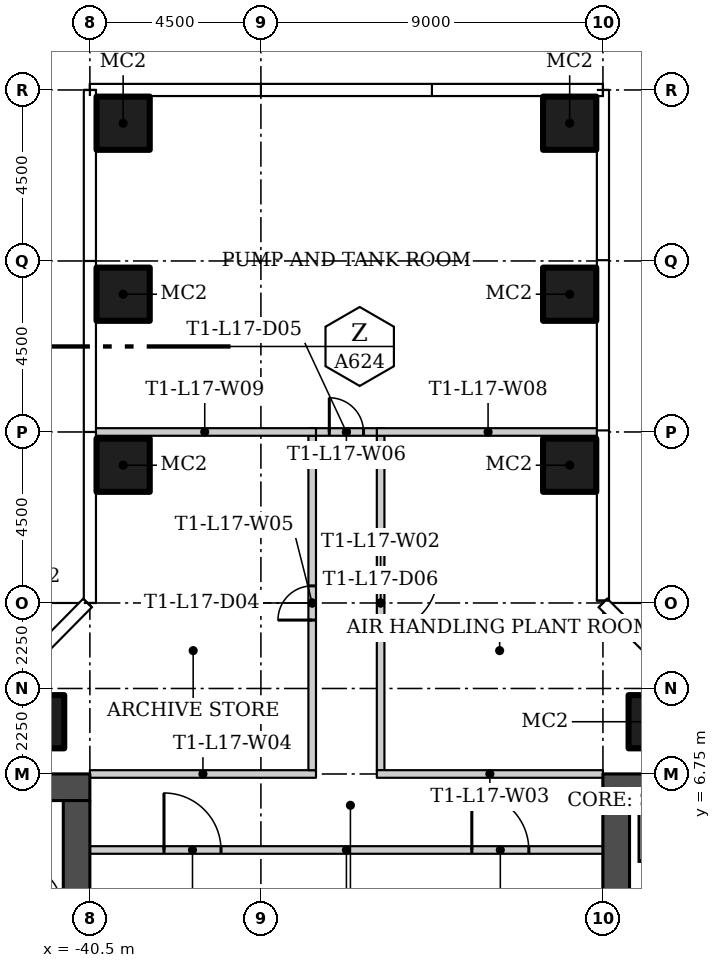
"""IFC4 building model, lengths in metres.
Left out: names, types, materials, properties, quantities, classifications, styles, units other than length and angle.
Written with IfcOpenShell. Run it as: python <this file> out.ifc"""

import sys

from ifc_helpers import new_model, si_unit, direction, frame, frame_2d, origin, origin_2d, place, context, subcontext, project, spatial, rectangle, hollow_rectangle, extrude, element, fill, save


model = new_model("IFC4")
c1 = context("Model", 3, precision=1e-05, world=origin(), true_north=direction((0.0, 1.0)))
c2 = subcontext(c1, "Body", "Model", "MODEL_VIEW")
j1 = project(units=[si_unit("LENGTHUNIT", "METRE"), si_unit("PLANEANGLEUNIT", "RADIAN")], contexts=[c1])
p1 = place(None, origin())
s1 = spatial("IfcSite", under=j1, at=p1, CompositionType="ELEMENT")
p2 = place(p1, origin())
s2 = spatial("IfcBuilding", under=s1, at=p2, CompositionType="ELEMENT")
p3 = place(p2, frame((0.0, 0.0, 77.1)))
s3 = spatial("IfcBuildingStorey", under=s2, at=p3, CompositionType="ELEMENT", Elevation=77.1)
for number, where in (
    (1, (-25.625, 8.125, 0.0)),
    (2, (-41.875, 8.125, 0.0)),
    (3, (-39.625, 14.875, 0.0)),
    (4, (-39.625, 19.375, 0.0)),
    (5, (-39.625, 23.875, 0.0)),
    (6, (-27.875, 14.875, 0.0)),
    (7, (-27.875, 19.375, 0.0)),
    (8, (-27.875, 23.875, 0.0)),
):
    element("IfcColumn", number, at=place(p3, frame(where)), inside=s3, PredefinedType="COLUMN", context=c2, shape_type="SweptSolid", body=[
        extrude(hollow_rectangle(XDim=1.4, YDim=1.4, WallThickness=0.05, at=origin_2d()), origin(), (0.0, 0.0, 1.0), 4.45),
    ])
p4 = place(p3, frame((-40.5, 4.75, 0.0)))
e9 = element("IfcWall", 9, at=p4, inside=s3, PredefinedType="PARTITIONING", context=c2, shape_type="SweptSolid", body=[
    extrude(rectangle(XDim=13.5, YDim=0.2, at=frame_2d((6.75, 0.0))), origin(), (0.0, 0.0, 1.0), 4.45),
])
p5 = place(p4, frame((1.95, 0.0, 0.0)))
e10 = element("IfcOpeningElement", 10, at=p5, cuts=e9, PredefinedType="OPENING", context=c2, shape_type="SweptSolid", body=[
    extrude(rectangle(XDim=1.5, YDim=2.4, at=frame_2d((0.75, 1.2))), frame((0.0, 0.11, 0.0), z_axis=(0.0, -1.0, 0.0), x_axis=(1.0, 0.0, 0.0)), (0.0, 0.0, 1.0), 0.22),
])
p6 = place(p4, frame((10.05, 0.0, 0.0)))
e11 = element("IfcOpeningElement", 11, at=p6, cuts=e9, PredefinedType="OPENING", context=c2, shape_type="SweptSolid", body=[
    extrude(rectangle(XDim=1.5, YDim=2.4, at=frame_2d((0.75, 1.2))), frame((0.0, 0.11, 0.0), z_axis=(0.0, -1.0, 0.0), x_axis=(1.0, 0.0, 0.0)), (0.0, 0.0, 1.0), 0.22),
])
p7 = place(p3, frame((-32.85, 15.65, 0.0), z_axis=(0.0, 0.0, 1.0), x_axis=(0.0, -1.0, 0.0)))
e12 = element("IfcWall", 12, at=p7, inside=s3, PredefinedType="PARTITIONING", context=c2, shape_type="SweptSolid", body=[
    extrude(rectangle(XDim=8.8, YDim=0.2, at=frame_2d((4.4, 0.0))), origin(), (0.0, 0.0, 1.0), 4.45),
])
p8 = place(p7, frame((3.65, 0.0, 0.0)))
e13 = element("IfcOpeningElement", 13, at=p8, cuts=e12, PredefinedType="OPENING", context=c2, shape_type="SweptSolid", body=[
    extrude(rectangle(XDim=1.5, YDim=2.4, at=frame_2d((0.75, 1.2))), frame((0.0, 0.11, 0.0), z_axis=(0.0, -1.0, 0.0), x_axis=(1.0, 0.0, 0.0)), (0.0, 0.0, 1.0), 0.22),
])
for number, where in (
    (14, (-32.95, 6.75, 0.0)),
    (15, (-40.5, 6.75, 0.0)),
):
    element("IfcWall", number, at=place(p3, frame(where)), inside=s3, PredefinedType="PARTITIONING", context=c2, shape_type="SweptSolid", body=[
        extrude(rectangle(XDim=5.95, YDim=0.2, at=frame_2d((2.975, 0.0))), origin(), (0.0, 0.0, 1.0), 4.45),
    ])
p9 = place(p3, frame((-34.65, 6.85, 0.0), z_axis=(0.0, 0.0, 1.0), x_axis=(0.0, 1.0, 0.0)))
e16 = element("IfcWall", 16, at=p9, inside=s3, PredefinedType="PARTITIONING", context=c2, shape_type="SweptSolid", body=[
    extrude(rectangle(XDim=8.8, YDim=0.2, at=frame_2d((4.4, 0.0))), origin(), (0.0, 0.0, 1.0), 4.45),
])
p10 = place(p9, frame((3.95, 0.0, 0.0)))
e17 = element("IfcOpeningElement", 17, at=p10, cuts=e16, PredefinedType="OPENING", context=c2, shape_type="SweptSolid", body=[
    extrude(rectangle(XDim=0.9, YDim=2.1, at=frame_2d((0.45, 1.05))), frame((0.0, 0.11, 0.0), z_axis=(0.0, -1.0, 0.0), x_axis=(1.0, 0.0, 0.0)), (0.0, 0.0, 1.0), 0.22),
])
p11 = place(p3, frame((-34.75, 15.75, 0.0)))
e18 = element("IfcWall", 18, at=p11, inside=s3, PredefinedType="PARTITIONING", context=c2, shape_type="SweptSolid", body=[
    extrude(rectangle(XDim=2.001, YDim=0.2, at=frame_2d((1.0, 0.0))), origin(), (0.0, 0.0, 1.0), 4.45),
])
p12 = place(p11, frame((0.55, 0.0, 0.0)))
e19 = element("IfcOpeningElement", 19, at=p12, cuts=e18, PredefinedType="OPENING", context=c2, shape_type="SweptSolid", body=[
    extrude(rectangle(XDim=0.9, YDim=2.4, at=frame_2d((0.45, 1.2))), frame((0.0, 0.11, 0.0), z_axis=(0.0, -1.0, 0.0), x_axis=(1.0, 0.0, 0.0)), (0.0, 0.0, 1.0), 0.22),
])
for number, where, z_axis, x_axis in (
    (20, (-27.095, 15.75, 0.0), (0.0, 0.0, 1.0), (-1.0, 0.0, 0.0)),
    (21, (-34.55, 15.75, 0.0), (0.0, 0.0, 1.0), (-1.0, 0.0, 0.0)),
):
    element("IfcWall", number, at=place(p3, frame(where, z_axis=z_axis, x_axis=x_axis)), inside=s3, PredefinedType="PARTITIONING", context=c2, shape_type="SweptSolid", body=[
        extrude(rectangle(XDim=5.855, YDim=0.2, at=frame_2d((2.927, 0.0))), origin(), (0.0, 0.0, 1.0), 4.45),
    ])
p13 = place(p3, frame((-27.0, 6.4, 0.0)))
e22 = element("IfcWall", 22, at=p13, inside=s3, PredefinedType="SHEAR", context=c2, shape_type="SweptSolid", body=[
    extrude(rectangle(XDim=13.5, YDim=0.7, at=frame_2d((6.75, 0.0))), origin(), (0.0, 0.0, 1.0), 4.45),
])
p14 = place(p3, frame((-26.65, 6.05, 0.0), z_axis=(0.0, 0.0, 1.0), x_axis=(0.0, -1.0, 0.0)))
e23 = element("IfcWall", 23, at=p14, inside=s3, PredefinedType="SHEAR", context=c2, shape_type="SweptSolid", body=[
    extrude(rectangle(XDim=12.1, YDim=0.7, at=frame_2d((6.05, 0.0))), origin(), (0.0, 0.0, 1.0), 4.45),
])
p15 = place(p14, frame((7.45, 0.0, 0.0)))
e24 = element("IfcOpeningElement", 24, at=p15, cuts=e23, PredefinedType="OPENING", context=c2, shape_type="SweptSolid", body=[
    extrude(rectangle(XDim=1.2, YDim=2.1, at=frame_2d((0.6, 1.05))), frame((0.0, 0.36, 0.0), z_axis=(0.0, -1.0, 0.0), x_axis=(1.0, 0.0, 0.0)), (0.0, 0.0, 1.0), 0.72),
])
p16 = place(p14, frame((3.9, 0.0, 0.0)))
e25 = element("IfcOpeningElement", 25, at=p16, cuts=e23, PredefinedType="OPENING", context=c2, shape_type="SweptSolid", body=[
    extrude(rectangle(XDim=1.8, YDim=2.4, at=frame_2d((0.9, 1.2))), frame((0.0, 0.36, 0.0), z_axis=(0.0, -1.0, 0.0), x_axis=(1.0, 0.0, 0.0)), (0.0, 0.0, 1.0), 0.72),
])
p17 = place(p3, frame((-40.5, 6.4, 0.0), z_axis=(0.0, 0.0, 1.0), x_axis=(-1.0, 0.0, 0.0)))
e26 = element("IfcWall", 26, at=p17, inside=s3, PredefinedType="SHEAR", context=c2, shape_type="SweptSolid", body=[
    extrude(rectangle(XDim=13.5, YDim=0.7, at=frame_2d((6.75, 0.0))), origin(), (0.0, 0.0, 1.0), 4.45),
])
p18 = place(p3, frame((-40.85, -6.05, 0.0), z_axis=(0.0, 0.0, 1.0), x_axis=(0.0, 1.0, 0.0)))
e27 = element("IfcWall", 27, at=p18, inside=s3, PredefinedType="SHEAR", context=c2, shape_type="SweptSolid", body=[
    extrude(rectangle(XDim=12.1, YDim=0.7, at=frame_2d((6.05, 0.0))), origin(), (0.0, 0.0, 1.0), 4.45),
])
p19 = place(p18, frame((3.45, 0.0, 0.0)))
e28 = element("IfcOpeningElement", 28, at=p19, cuts=e27, PredefinedType="OPENING", context=c2, shape_type="SweptSolid", body=[
    extrude(rectangle(XDim=1.2, YDim=2.1, at=frame_2d((0.6, 1.05))), frame((0.0, 0.36, 0.0), z_axis=(0.0, -1.0, 0.0), x_axis=(1.0, 0.0, 0.0)), (0.0, 0.0, 1.0), 0.72),
])
p20 = place(p18, frame((6.4, 0.0, 0.0)))
e29 = element("IfcOpeningElement", 29, at=p20, cuts=e27, PredefinedType="OPENING", context=c2, shape_type="SweptSolid", body=[
    extrude(rectangle(XDim=1.8, YDim=2.4, at=frame_2d((0.9, 1.2))), frame((0.0, 0.36, 0.0), z_axis=(0.0, -1.0, 0.0), x_axis=(1.0, 0.0, 0.0)), (0.0, 0.0, 1.0), 0.72),
])
p21 = place(p5, origin())
e30 = element("IfcDoor", 30, at=p21, inside=s3, OperationType="DOUBLE_DOOR_SINGLE_SWING", PredefinedType="DOOR", context=c2, shape_type="SweptSolid", body=[
    extrude(rectangle(XDim=1.5, YDim=2.4, at=frame_2d((0.75, 1.2))), frame((0.0, 0.025, 0.0), z_axis=(0.0, -1.0, 0.0), x_axis=(1.0, 0.0, 0.0)), (0.0, 0.0, 1.0), 0.05),
])
fill(e10, e30)
p22 = place(p6, origin())
e31 = element("IfcDoor", 31, at=p22, inside=s3, OperationType="DOUBLE_DOOR_SINGLE_SWING", PredefinedType="DOOR", context=c2, shape_type="SweptSolid", body=[
    extrude(rectangle(XDim=1.5, YDim=2.4, at=frame_2d((0.75, 1.2))), frame((0.0, 0.025, 0.0), z_axis=(0.0, -1.0, 0.0), x_axis=(1.0, 0.0, 0.0)), (0.0, 0.0, 1.0), 0.05),
])
fill(e11, e31)
p23 = place(p10, origin())
e32 = element("IfcDoor", 32, at=p23, inside=s3, OperationType="SINGLE_SWING_LEFT", PredefinedType="DOOR", context=c2, shape_type="SweptSolid", body=[
    extrude(rectangle(XDim=0.9, YDim=2.1, at=frame_2d((0.45, 1.05))), frame((0.0, 0.025, 0.0), z_axis=(0.0, -1.0, 0.0), x_axis=(1.0, 0.0, 0.0)), (0.0, 0.0, 1.0), 0.05),
])
fill(e17, e32)
p24 = place(p12, origin())
e33 = element("IfcDoor", 33, at=p24, inside=s3, OperationType="SINGLE_SWING_RIGHT", PredefinedType="DOOR", context=c2, shape_type="SweptSolid", body=[
    extrude(rectangle(XDim=0.9, YDim=2.4, at=frame_2d((0.45, 1.2))), frame((0.0, 0.025, 0.0), z_axis=(0.0, -1.0, 0.0), x_axis=(1.0, 0.0, 0.0)), (0.0, 0.0, 1.0), 0.05),
])
fill(e19, e33)
p25 = place(p8, origin())
e34 = element("IfcDoor", 34, at=p25, inside=s3, OperationType="DOUBLE_DOOR_SINGLE_SWING", PredefinedType="DOOR", context=c2, shape_type="SweptSolid", body=[
    extrude(rectangle(XDim=1.5, YDim=2.4, at=frame_2d((0.75, 1.2))), frame((0.0, 0.025, 0.0), z_axis=(0.0, -1.0, 0.0), x_axis=(1.0, 0.0, 0.0)), (0.0, 0.0, 1.0), 0.05),
])
fill(e13, e34)
save(model, sys.argv[1])
